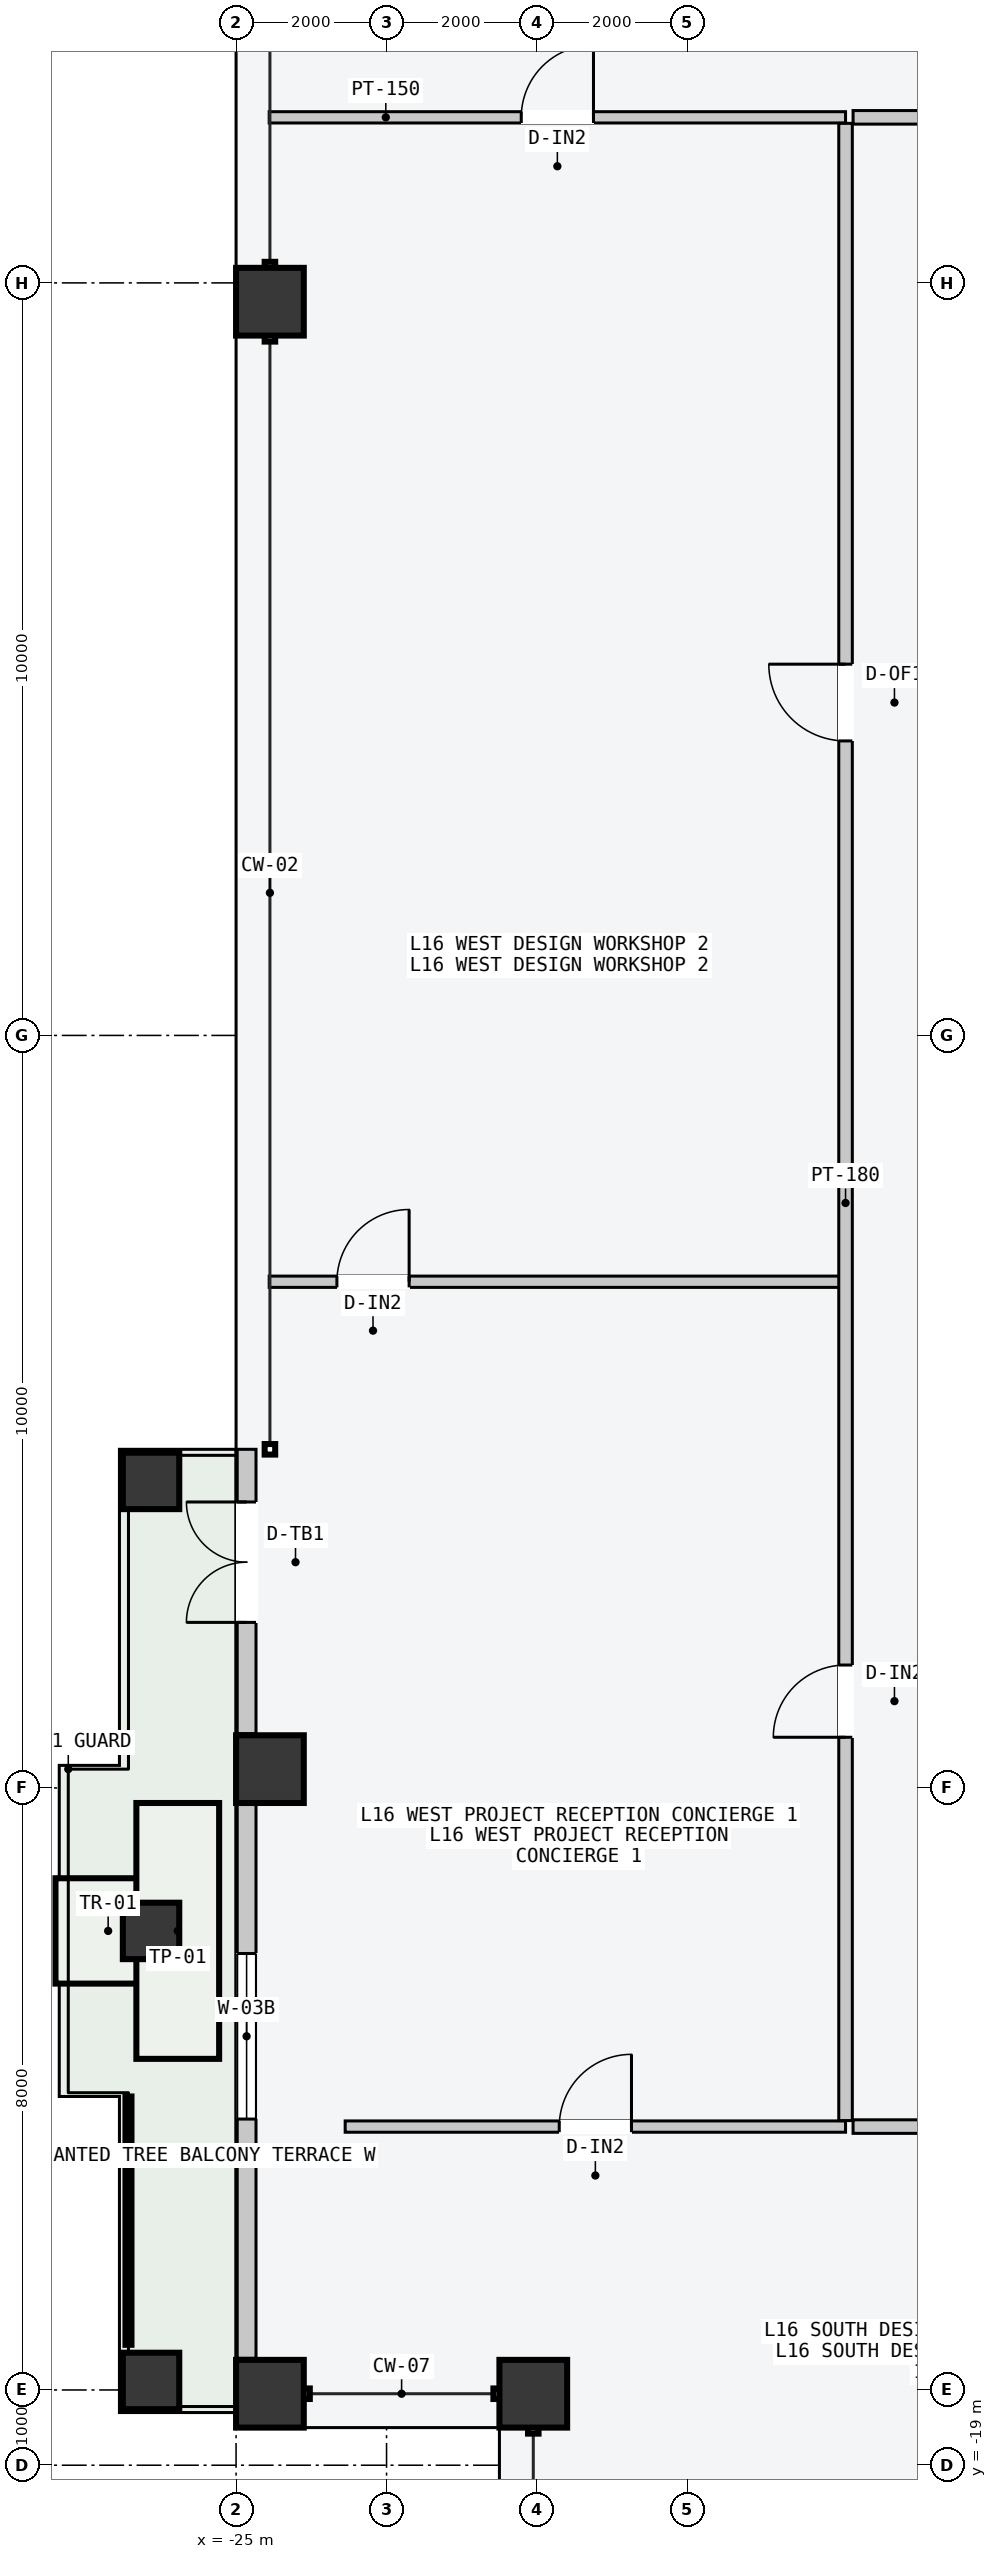
"""IFC4 building model, lengths in metres.
Left out: names, types, materials, properties, quantities, classifications, styles, units other than length and angle.
Written with IfcOpenShell. Run it as: python <this file> out.ifc"""

import sys

from ifc_helpers import new_model, si_unit, direction, frame, frame_2d, origin, origin_2d, place, context, subcontext, project, spatial, rectangle, hollow_rectangle, extrude, element, fill, save


model = new_model("IFC4")
c1 = context("Model", 3, precision=1e-05, world=origin(), true_north=direction((0.0, 1.0)))
c2 = subcontext(c1, "Body", "Model", "MODEL_VIEW")
j1 = project(units=[si_unit("LENGTHUNIT", "METRE"), si_unit("PLANEANGLEUNIT", "RADIAN")], contexts=[c1])
p1 = place(None, origin())
s1 = spatial("IfcSite", under=j1, at=p1, CompositionType="ELEMENT")
p2 = place(p1, origin())
s2 = spatial("IfcBuilding", under=s1, at=p2, CompositionType="ELEMENT")
p3 = place(p2, frame((0.0, 0.0, 63.6)))
s3 = spatial("IfcBuildingStorey", under=s2, at=p3, CompositionType="ELEMENT", Elevation=63.6)
for number, where, z_axis, x_axis in (
    (1, (-24.55, -18.05, 0.0), (0.0, 0.0, 1.0), (0.0, 1.0, 0.0)),
    (2, (-24.55, -9.75, 0.0), (0.0, 0.0, 1.0), (0.0, 1.0, 0.0)),
    (3, (-24.55, 9.75, 0.0), (0.0, 0.0, 1.0), (0.0, 1.0, 0.0)),
    (4, (-21.05, -18.05, 0.0), (0.0, 0.0, 1.0), (1.0, 0.0, 0.0)),
):
    element("IfcColumn", number, at=place(p3, frame(where, z_axis=z_axis, x_axis=x_axis)), inside=s3, PredefinedType="COLUMN", context=c2, shape_type="SweptSolid", body=[
        extrude(hollow_rectangle(XDim=0.9, YDim=0.9, WallThickness=0.045, at=origin_2d()), origin(), (0.0, 0.0, 1.0), 3.6),
    ])
for number, where, z_axis, x_axis in (
    (5, (-26.13, -17.88, 0.0), (0.0, 0.0, 1.0), (0.0, 1.0, 0.0)),
    (6, (-26.13, -5.92, 0.0), (0.0, 0.0, 1.0), (0.0, 1.0, 0.0)),
    (7, (-26.13, -11.9, 0.0), (0.0, 0.0, 1.0), (0.0, 1.0, 0.0)),
):
    element("IfcColumn", number, at=place(p3, frame(where, z_axis=z_axis, x_axis=x_axis)), inside=s3, PredefinedType="COLUMN", context=c2, shape_type="SweptSolid", body=[
        extrude(hollow_rectangle(XDim=0.75, YDim=0.75, WallThickness=0.032, at=origin_2d()), origin(), (0.0, 0.0, 1.0), 3.6),
    ])
p4 = place(p3, frame((-24.86, -17.58, 0.0), z_axis=(0.0, 0.0, 1.0), x_axis=(0.0, 1.0, 0.0)))
e8 = element("IfcWall", 8, at=p4, inside=s3, PredefinedType="STANDARD", context=c2, shape_type="SweptSolid", body=[
    extrude(rectangle(XDim=7.36, YDim=0.25, at=frame_2d((3.68, 0.0))), origin(), (0.0, 0.0, 1.0), 3.4),
])
p5 = place(p4, frame((3.18, 0.0, 0.85)))
e9 = element("IfcOpeningElement", 9, at=p5, cuts=e8, PredefinedType="OPENING", context=c2, shape_type="SweptSolid", body=[
    extrude(rectangle(XDim=2.2, YDim=2.1, at=frame_2d((1.1, 1.05))), frame((0.0, 0.135, 0.0), z_axis=(0.0, -1.0, 0.0), x_axis=(1.0, 0.0, 0.0)), (0.0, 0.0, 1.0), 0.27),
])
p6 = place(p3, frame((-24.86, -9.28, 0.0), z_axis=(0.0, 0.0, 1.0), x_axis=(0.0, 1.0, 0.0)))
e10 = element("IfcWall", 10, at=p6, inside=s3, PredefinedType="STANDARD", context=c2, shape_type="SweptSolid", body=[
    extrude(rectangle(XDim=3.78, YDim=0.25, at=frame_2d((1.89, 0.0))), origin(), (0.0, 0.0, 1.0), 3.4),
])
p7 = place(p6, frame((1.48, 0.0, 0.0)))
e11 = element("IfcOpeningElement", 11, at=p7, cuts=e10, PredefinedType="OPENING", context=c2, shape_type="SweptSolid", body=[
    extrude(rectangle(XDim=1.6, YDim=2.2, at=frame_2d((0.8, 1.1))), frame((0.0, 0.135, 0.0), z_axis=(0.0, -1.0, 0.0), x_axis=(1.0, 0.0, 0.0)), (0.0, 0.0, 1.0), 0.27),
])
p8 = place(p3, frame((-16.8, 12.2, 0.0), z_axis=(0.0, 0.0, 1.0), x_axis=(1.0, 0.0, 0.0)))
e12 = element("IfcWall", 12, at=p8, inside=s3, PredefinedType="PARTITIONING", context=c2, shape_type="SweptSolid", body=[
    extrude(rectangle(XDim=33.6, YDim=0.18, at=frame_2d((16.8, 0.0))), origin(), (0.0, 0.0, 1.0), 3.4),
])
p9 = place(p8, frame((16.35, 0.0, 0.0)))
e13 = element("IfcOpeningElement", 13, at=p9, cuts=e12, PredefinedType="OPENING", context=c2, shape_type="SweptSolid", body=[
    extrude(rectangle(XDim=0.9, YDim=2.15, at=frame_2d((0.45, 1.075))), frame((0.0, 0.1, 0.0), z_axis=(0.0, -1.0, 0.0), x_axis=(1.0, 0.0, 0.0)), (0.0, 0.0, 1.0), 0.2),
])
p10 = place(p3, frame((-24.56, 12.2, 0.0), z_axis=(0.0, 0.0, 1.0), x_axis=(1.0, 0.0, 0.0)))
e14 = element("IfcWall", 14, at=p10, inside=s3, PredefinedType="PARTITIONING", context=c2, shape_type="SweptSolid", body=[
    extrude(rectangle(XDim=7.66, YDim=0.15, at=frame_2d((3.83, 0.0))), origin(), (0.0, 0.0, 1.0), 3.4),
])
p11 = place(p10, frame((3.35, 0.0, 0.0)))
e15 = element("IfcOpeningElement", 15, at=p11, cuts=e14, PredefinedType="OPENING", context=c2, shape_type="SweptSolid", body=[
    extrude(rectangle(XDim=0.96, YDim=2.18, at=frame_2d((0.48, 1.09))), frame((0.0, 0.085, 0.0), z_axis=(0.0, -1.0, 0.0), x_axis=(1.0, 0.0, 0.0)), (0.0, 0.0, 1.0), 0.17),
])
p12 = place(p3, frame((-16.8, -14.5, 0.0), z_axis=(0.0, 0.0, 1.0), x_axis=(1.0, 0.0, 0.0)))
e16 = element("IfcWall", 16, at=p12, inside=s3, PredefinedType="PARTITIONING", context=c2, shape_type="SweptSolid", body=[
    extrude(rectangle(XDim=33.6, YDim=0.18, at=frame_2d((16.8, 0.0))), origin(), (0.0, 0.0, 1.0), 3.4),
])
p13 = place(p12, frame((4.087, 0.0, 0.0)))
e17 = element("IfcOpeningElement", 17, at=p13, cuts=e16, PredefinedType="OPENING", context=c2, shape_type="SweptSolid", body=[
    extrude(rectangle(XDim=1.06, YDim=2.2, at=frame_2d((0.53, 1.1))), frame((0.0, 0.1, 0.0), z_axis=(0.0, -1.0, 0.0), x_axis=(1.0, 0.0, 0.0)), (0.0, 0.0, 1.0), 0.2),
])
p14 = place(p12, frame((13.791, 0.0, 0.0)))
e18 = element("IfcOpeningElement", 18, at=p14, cuts=e16, PredefinedType="OPENING", context=c2, shape_type="SweptSolid", body=[
    extrude(rectangle(XDim=1.24, YDim=2.24, at=frame_2d((0.62, 1.12))), frame((0.0, 0.1, 0.0), z_axis=(0.0, -1.0, 0.0), x_axis=(1.0, 0.0, 0.0)), (0.0, 0.0, 1.0), 0.2),
])
p15 = place(p12, frame((23.467, 0.0, 0.0)))
e19 = element("IfcOpeningElement", 19, at=p15, cuts=e16, PredefinedType="OPENING", context=c2, shape_type="SweptSolid", body=[
    extrude(rectangle(XDim=1.4, YDim=2.2, at=frame_2d((0.7, 1.1))), frame((0.0, 0.1, 0.0), z_axis=(0.0, -1.0, 0.0), x_axis=(1.0, 0.0, 0.0)), (0.0, 0.0, 1.0), 0.2),
])
p16 = place(p12, frame((30.723, 0.0, 0.0)))
e20 = element("IfcOpeningElement", 20, at=p16, cuts=e16, PredefinedType="OPENING", context=c2, shape_type="SweptSolid", body=[
    extrude(rectangle(XDim=0.9, YDim=2.15, at=frame_2d((0.45, 1.075))), frame((0.0, 0.1, 0.0), z_axis=(0.0, -1.0, 0.0), x_axis=(1.0, 0.0, 0.0)), (0.0, 0.0, 1.0), 0.2),
])
p17 = place(p3, frame((-23.55, -14.5, 0.0), z_axis=(0.0, 0.0, 1.0), x_axis=(1.0, 0.0, 0.0)))
e21 = element("IfcWall", 21, at=p17, inside=s3, PredefinedType="PARTITIONING", context=c2, shape_type="SweptSolid", body=[
    extrude(rectangle(XDim=6.65, YDim=0.15, at=frame_2d((3.325, 0.0))), origin(), (0.0, 0.0, 1.0), 3.4),
])
p18 = place(p17, frame((2.845, 0.0, 0.0)))
e22 = element("IfcOpeningElement", 22, at=p18, cuts=e21, PredefinedType="OPENING", context=c2, shape_type="SweptSolid", body=[
    extrude(rectangle(XDim=0.96, YDim=2.18, at=frame_2d((0.48, 1.09))), frame((0.0, 0.085, 0.0), z_axis=(0.0, -1.0, 0.0), x_axis=(1.0, 0.0, 0.0)), (0.0, 0.0, 1.0), 0.17),
])
p19 = place(p3, frame((-24.56, -3.273, 0.0), z_axis=(0.0, 0.0, 1.0), x_axis=(1.0, 0.0, 0.0)))
e23 = element("IfcWall", 23, at=p19, inside=s3, PredefinedType="PARTITIONING", context=c2, shape_type="SweptSolid", body=[
    extrude(rectangle(XDim=7.6, YDim=0.15, at=frame_2d((3.8, 0.0))), origin(), (0.0, 0.0, 1.0), 2.95),
])
p20 = place(p19, frame((0.9, 0.0, 0.0)))
e24 = element("IfcOpeningElement", 24, at=p20, cuts=e23, PredefinedType="OPENING", context=c2, shape_type="SweptSolid", body=[
    extrude(rectangle(XDim=0.96, YDim=2.18, at=frame_2d((0.48, 1.09))), frame((0.0, 0.085, 0.0), z_axis=(0.0, -1.0, 0.0), x_axis=(1.0, 0.0, 0.0)), (0.0, 0.0, 1.0), 0.17),
])
p21 = place(p3, frame((-16.9, -14.42, 0.0), z_axis=(0.0, 0.0, 1.0), x_axis=(0.0, 1.0, 0.0)))
e25 = element("IfcWall", 25, at=p21, inside=s3, PredefinedType="PARTITIONING", context=c2, shape_type="SweptSolid", body=[
    extrude(rectangle(XDim=26.54, YDim=0.18, at=frame_2d((13.27, 0.0))), origin(), (0.0, 0.0, 1.0), 3.4),
])
p22 = place(p21, frame((5.094, 0.0, 0.0)))
e26 = element("IfcOpeningElement", 26, at=p22, cuts=e25, PredefinedType="OPENING", context=c2, shape_type="SweptSolid", body=[
    extrude(rectangle(XDim=0.96, YDim=2.18, at=frame_2d((0.48, 1.09))), frame((0.0, 0.1, 0.0), z_axis=(0.0, -1.0, 0.0), x_axis=(1.0, 0.0, 0.0)), (0.0, 0.0, 1.0), 0.2),
])
p23 = place(p21, frame((18.333, 0.0, 0.0)))
e27 = element("IfcOpeningElement", 27, at=p23, cuts=e25, PredefinedType="OPENING", context=c2, shape_type="SweptSolid", body=[
    extrude(rectangle(XDim=1.02, YDim=2.2, at=frame_2d((0.51, 1.1))), frame((0.0, 0.1, 0.0), z_axis=(0.0, -1.0, 0.0), x_axis=(1.0, 0.0, 0.0)), (0.0, 0.0, 1.0), 0.2),
])
p24 = place(p5, origin())
e28 = element("IfcWindow", 28, at=p24, inside=s3, PartitioningType="SINGLE_PANEL", PredefinedType="WINDOW", context=c2, shape_type="SweptSolid", body=[
    extrude(rectangle(XDim=2.2, YDim=2.1, at=frame_2d((1.1, 1.05))), frame((0.0, 0.03, 0.0), z_axis=(0.0, -1.0, 0.0), x_axis=(1.0, 0.0, 0.0)), (0.0, 0.0, 1.0), 0.06),
])
fill(e9, e28)
p25 = place(p7, origin())
e29 = element("IfcDoor", 29, at=p25, inside=s3, OperationType="DOUBLE_DOOR_SINGLE_SWING", PredefinedType="DOOR", context=c2, shape_type="SweptSolid", body=[
    extrude(rectangle(XDim=1.6, YDim=2.2, at=frame_2d((0.8, 1.1))), frame((0.0, 0.025, 0.0), z_axis=(0.0, -1.0, 0.0), x_axis=(1.0, 0.0, 0.0)), (0.0, 0.0, 1.0), 0.05),
])
fill(e11, e29)
p26 = place(p11, origin())
e30 = element("IfcDoor", 30, at=p26, inside=s3, OperationType="SINGLE_SWING_RIGHT", PredefinedType="DOOR", context=c2, shape_type="SweptSolid", body=[
    extrude(rectangle(XDim=0.96, YDim=2.18, at=frame_2d((0.48, 1.09))), frame((0.0, 0.025, 0.0), z_axis=(0.0, -1.0, 0.0), x_axis=(1.0, 0.0, 0.0)), (0.0, 0.0, 1.0), 0.05),
])
fill(e15, e30)
p27 = place(p18, origin())
e31 = element("IfcDoor", 31, at=p27, inside=s3, OperationType="SINGLE_SWING_RIGHT", PredefinedType="DOOR", context=c2, shape_type="SweptSolid", body=[
    extrude(rectangle(XDim=0.96, YDim=2.18, at=frame_2d((0.48, 1.09))), frame((0.0, 0.025, 0.0), z_axis=(0.0, -1.0, 0.0), x_axis=(1.0, 0.0, 0.0)), (0.0, 0.0, 1.0), 0.05),
])
fill(e22, e31)
p28 = place(p20, origin())
e32 = element("IfcDoor", 32, at=p28, inside=s3, OperationType="SINGLE_SWING_RIGHT", PredefinedType="DOOR", context=c2, shape_type="SweptSolid", body=[
    extrude(rectangle(XDim=0.96, YDim=2.18, at=frame_2d((0.48, 1.09))), frame((0.0, 0.025, 0.0), z_axis=(0.0, -1.0, 0.0), x_axis=(1.0, 0.0, 0.0)), (0.0, 0.0, 1.0), 0.05),
])
fill(e24, e32)
p29 = place(p22, origin())
e33 = element("IfcDoor", 33, at=p29, inside=s3, OperationType="SINGLE_SWING_LEFT", PredefinedType="DOOR", context=c2, shape_type="SweptSolid", body=[
    extrude(rectangle(XDim=0.96, YDim=2.18, at=frame_2d((0.48, 1.09))), frame((0.0, 0.025, 0.0), z_axis=(0.0, -1.0, 0.0), x_axis=(1.0, 0.0, 0.0)), (0.0, 0.0, 1.0), 0.05),
])
fill(e26, e33)
p30 = place(p23, origin())
e34 = element("IfcDoor", 34, at=p30, inside=s3, OperationType="SINGLE_SWING_RIGHT", PredefinedType="DOOR", context=c2, shape_type="SweptSolid", body=[
    extrude(rectangle(XDim=1.02, YDim=2.2, at=frame_2d((0.51, 1.1))), frame((0.0, 0.025, 0.0), z_axis=(0.0, -1.0, 0.0), x_axis=(1.0, 0.0, 0.0)), (0.0, 0.0, 1.0), 0.05),
])
fill(e27, e34)
save(model, sys.argv[1])
